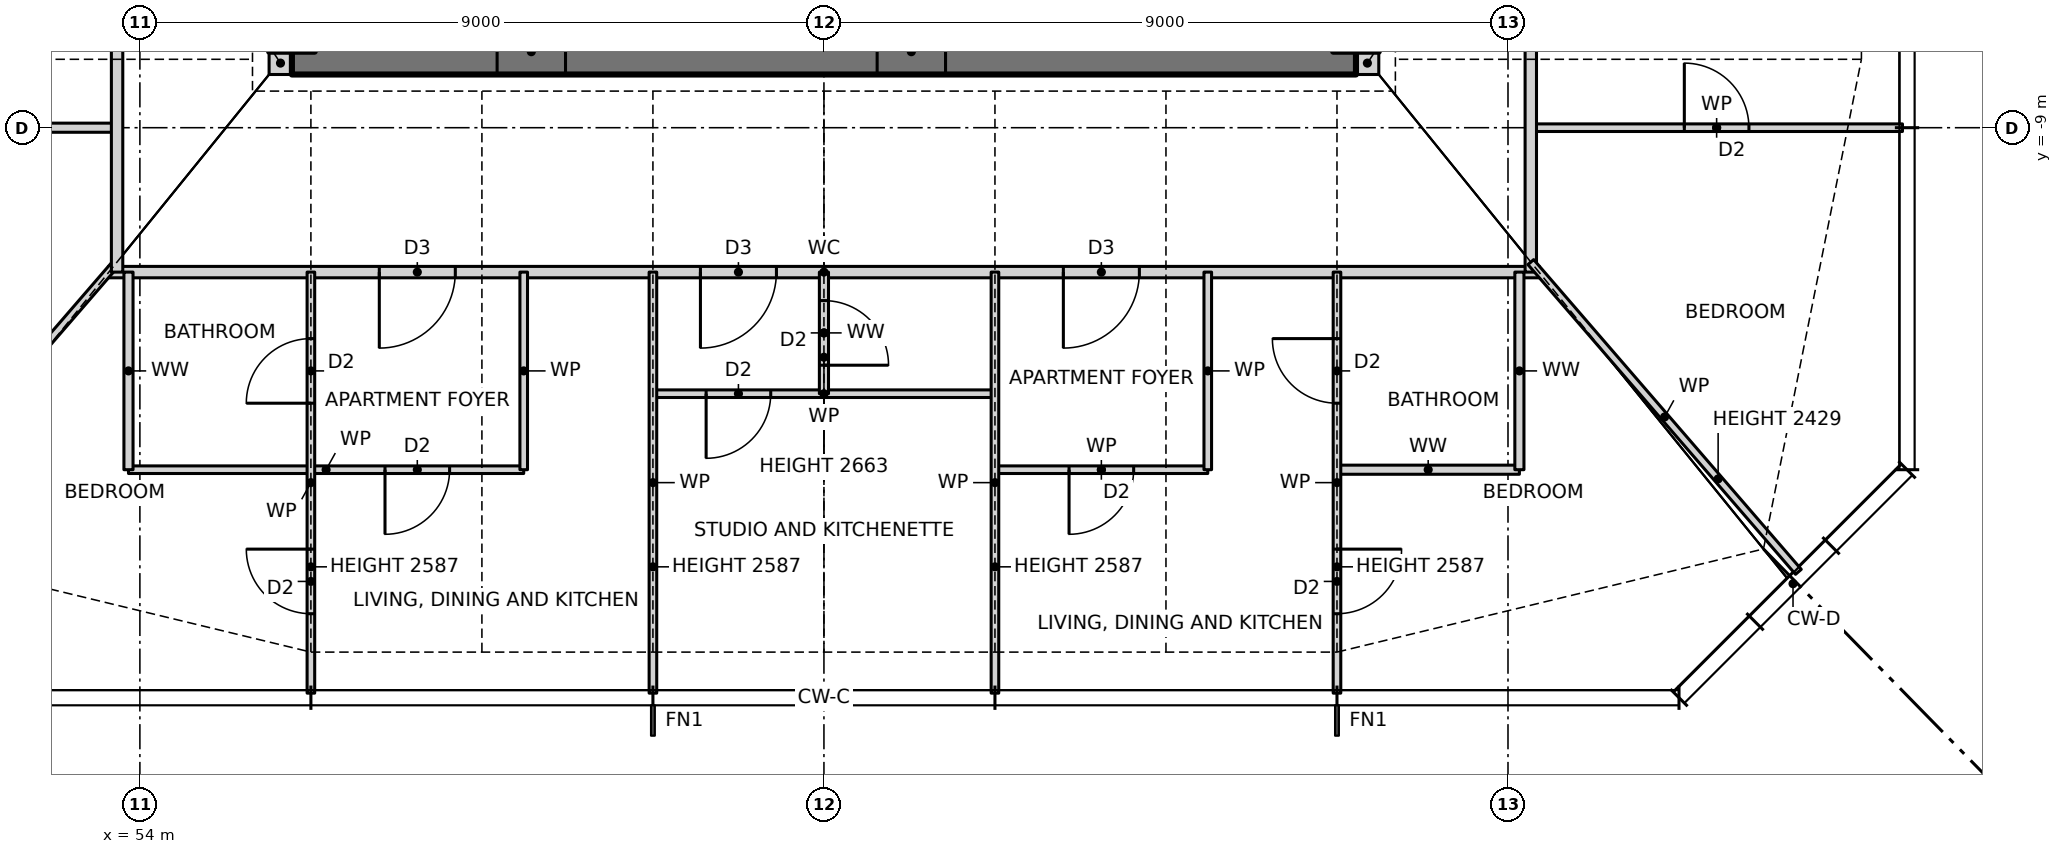
"""IFC4 building model, lengths in metres.
Left out: names, types, materials, properties, quantities, classifications, styles, units other than length and angle.
Written with IfcOpenShell. Run it as: python <this file> out.ifc"""

import sys

from ifc_helpers import new_model, si_unit, direction, frame, frame_2d, origin, place, context, subcontext, project, spatial, rectangle, extrude, element, fill, save


model = new_model("IFC4")
c1 = context("Model", 3, precision=1e-05, world=origin(), true_north=direction((0.0, 1.0)))
c2 = subcontext(c1, "Body", "Model", "MODEL_VIEW")
j1 = project(units=[si_unit("LENGTHUNIT", "METRE"), si_unit("PLANEANGLEUNIT", "RADIAN")], contexts=[c1])
p1 = place(None, origin())
s1 = spatial("IfcSite", under=j1, at=p1, CompositionType="ELEMENT")
p2 = place(p1, origin())
s2 = spatial("IfcBuilding", under=s1, at=p2, CompositionType="ELEMENT")
p3 = place(p2, frame((0.0, 0.0, 80.5)))
s3 = spatial("IfcBuildingStorey", under=s2, at=p3, CompositionType="ELEMENT", Elevation=80.5)
for number, where, z_axis, x_axis in (
    (1, (55.7, -8.15, 0.0), (0.0, 0.0, 1.0), (1.0, 0.0, 0.0)),
    (2, (70.0, -8.15, 0.0), (0.0, 0.0, 1.0), (1.0, 0.0, 0.0)),
):
    element("IfcWall", number, at=place(p3, frame(where, z_axis=z_axis, x_axis=x_axis)), inside=s3, PredefinedType="SOLIDWALL", context=c2, shape_type="SweptSolid", body=[
        extrude(rectangle(XDim=0.3, YDim=0.3, at=frame_2d((0.15, 0.0))), origin(), (0.0, 0.0, 1.0), 3.5),
    ])
p4 = place(p3, frame((56.0, -8.0, 0.0), z_axis=(0.0, 0.0, 1.0), x_axis=(1.0, 0.0, 0.0)))
e3 = element("IfcWall", 3, at=p4, inside=s3, PredefinedType="SHEAR", context=c2, shape_type="SweptSolid", body=[
    extrude(rectangle(XDim=14.0, YDim=0.6, at=frame_2d((7.0, 0.0))), origin(), (0.0, 0.0, 1.0), 3.5),
])
p5 = place(p4, frame((2.7, 0.0, 0.0)))
e4 = element("IfcOpeningElement", 4, at=p5, cuts=e3, PredefinedType="OPENING", context=c2, shape_type="SweptSolid", body=[
    extrude(rectangle(XDim=0.9, YDim=2.1, at=frame_2d((0.45, 1.05))), frame((0.0, 0.31, 0.0), z_axis=(0.0, -1.0, 0.0), x_axis=(1.0, 0.0, 0.0)), (0.0, 0.0, 1.0), 0.62),
])
p6 = place(p4, frame((7.7, 0.0, 0.0)))
e5 = element("IfcOpeningElement", 5, at=p6, cuts=e3, PredefinedType="OPENING", context=c2, shape_type="SweptSolid", body=[
    extrude(rectangle(XDim=0.9, YDim=2.1, at=frame_2d((0.45, 1.05))), frame((0.0, 0.31, 0.0), z_axis=(0.0, -1.0, 0.0), x_axis=(1.0, 0.0, 0.0)), (0.0, 0.0, 1.0), 0.62),
])
p7 = place(p3, frame((53.85, -13.5, 0.0), z_axis=(0.0, 0.0, 1.0), x_axis=(1.0, 0.0, 0.0)))
e6 = element("IfcWall", 6, at=p7, inside=s3, PredefinedType="PARTITIONING", context=c2, shape_type="SweptSolid", body=[
    extrude(rectangle(XDim=5.2, YDim=0.1, at=frame_2d((2.6, 0.0))), origin(), (0.0, 0.0, 1.0), 3.27),
])
p8 = place(p7, frame((3.375, 0.0, 0.0)))
e7 = element("IfcOpeningElement", 7, at=p8, cuts=e6, PredefinedType="OPENING", context=c2, shape_type="SweptSolid", body=[
    extrude(rectangle(XDim=0.85, YDim=2.1, at=frame_2d((0.425, 1.05))), frame((0.0, 0.06, 0.0), z_axis=(0.0, -1.0, 0.0), x_axis=(1.0, 0.0, 0.0)), (0.0, 0.0, 1.0), 0.12),
])
p9 = place(p3, frame((65.25, -13.5, 0.0), z_axis=(0.0, 0.0, 1.0), x_axis=(1.0, 0.0, 0.0)))
e8 = element("IfcWall", 8, at=p9, inside=s3, PredefinedType="PARTITIONING", context=c2, shape_type="SweptSolid", body=[
    extrude(rectangle(XDim=2.8, YDim=0.1, at=frame_2d((1.4, 0.0))), origin(), (0.0, 0.0, 1.0), 3.27),
])
p10 = place(p9, frame((0.975, 0.0, 0.0)))
e9 = element("IfcOpeningElement", 9, at=p10, cuts=e8, PredefinedType="OPENING", context=c2, shape_type="SweptSolid", body=[
    extrude(rectangle(XDim=0.85, YDim=2.1, at=frame_2d((0.425, 1.05))), frame((0.0, 0.06, 0.0), z_axis=(0.0, -1.0, 0.0), x_axis=(1.0, 0.0, 0.0)), (0.0, 0.0, 1.0), 0.12),
])
p11 = place(p3, frame((69.75, -13.5, 0.0), z_axis=(0.0, 0.0, 1.0), x_axis=(1.0, 0.0, 0.0)))
e10 = element("IfcWall", 10, at=p11, inside=s3, PredefinedType="PARTITIONING", context=c2, shape_type="SweptSolid", body=[
    extrude(rectangle(XDim=2.4, YDim=0.12, at=frame_2d((1.2, 0.0))), origin(), (0.0, 0.0, 1.0), 3.27),
])
p12 = place(p3, frame((60.75, -12.5, 0.0), z_axis=(0.0, 0.0, 1.0), x_axis=(1.0, 0.0, 0.0)))
e11 = element("IfcWall", 11, at=p12, inside=s3, PredefinedType="PARTITIONING", context=c2, shape_type="SweptSolid", body=[
    extrude(rectangle(XDim=4.5, YDim=0.1, at=frame_2d((2.25, 0.0))), origin(), (0.0, 0.0, 1.0), 3.27),
])
p13 = place(p12, frame((0.7, 0.0, 0.0)))
e12 = element("IfcOpeningElement", 12, at=p13, cuts=e11, PredefinedType="OPENING", context=c2, shape_type="SweptSolid", body=[
    extrude(rectangle(XDim=0.85, YDim=2.1, at=frame_2d((0.425, 1.05))), frame((0.0, 0.06, 0.0), z_axis=(0.0, -1.0, 0.0), x_axis=(1.0, 0.0, 0.0)), (0.0, 0.0, 1.0), 0.12),
])
p14 = place(p3, frame((53.586, -10.9, 0.0), z_axis=(0.0, 0.0, 1.0), x_axis=(1.0, 0.0, 0.0)))
e13 = element("IfcWall", 13, at=p14, inside=s3, PredefinedType="PARTITIONING", context=c2, shape_type="SweptSolid", body=[
    extrude(rectangle(XDim=18.828, YDim=0.15, at=frame_2d((9.414, 0.0))), origin(), (0.0, 0.0, 1.0), 3.27),
])
p15 = place(p14, frame((3.564, 0.0, 0.0)))
e14 = element("IfcOpeningElement", 14, at=p15, cuts=e13, PredefinedType="OPENING", context=c2, shape_type="SweptSolid", body=[
    extrude(rectangle(XDim=1.0, YDim=2.1, at=frame_2d((0.5, 1.05))), frame((0.0, 0.085, 0.0), z_axis=(0.0, -1.0, 0.0), x_axis=(1.0, 0.0, 0.0)), (0.0, 0.0, 1.0), 0.17),
])
p16 = place(p14, frame((7.789, 0.0, 0.0)))
e15 = element("IfcOpeningElement", 15, at=p16, cuts=e13, PredefinedType="OPENING", context=c2, shape_type="SweptSolid", body=[
    extrude(rectangle(XDim=1.0, YDim=2.1, at=frame_2d((0.5, 1.05))), frame((0.0, 0.085, 0.0), z_axis=(0.0, -1.0, 0.0), x_axis=(1.0, 0.0, 0.0)), (0.0, 0.0, 1.0), 0.17),
])
p17 = place(p14, frame((12.564, 0.0, 0.0)))
e16 = element("IfcOpeningElement", 16, at=p17, cuts=e13, PredefinedType="OPENING", context=c2, shape_type="SweptSolid", body=[
    extrude(rectangle(XDim=1.0, YDim=2.1, at=frame_2d((0.5, 1.05))), frame((0.0, 0.085, 0.0), z_axis=(0.0, -1.0, 0.0), x_axis=(1.0, 0.0, 0.0)), (0.0, 0.0, 1.0), 0.17),
])
p18 = place(p3, frame((48.81, -9.0, 0.0), z_axis=(0.0, 0.0, 1.0), x_axis=(1.0, 0.0, 0.0)))
e17 = element("IfcWall", 17, at=p18, inside=s3, PredefinedType="PARTITIONING", context=c2, shape_type="SweptSolid", body=[
    extrude(rectangle(XDim=4.89, YDim=0.12, at=frame_2d((2.445, 0.0))), origin(), (0.0, 0.0, 1.0), 3.27),
])
p19 = place(p18, frame((0.72, 0.0, 0.0)))
e18 = element("IfcOpeningElement", 18, at=p19, cuts=e17, PredefinedType="OPENING", context=c2, shape_type="SweptSolid", body=[
    extrude(rectangle(XDim=0.85, YDim=2.1, at=frame_2d((0.425, 1.05))), frame((0.0, 0.07, 0.0), z_axis=(0.0, -1.0, 0.0), x_axis=(1.0, 0.0, 0.0)), (0.0, 0.0, 1.0), 0.14),
])
p20 = place(p3, frame((72.3, -9.0, 0.0), z_axis=(0.0, 0.0, 1.0), x_axis=(1.0, 0.0, 0.0)))
e19 = element("IfcWall", 19, at=p20, inside=s3, PredefinedType="PARTITIONING", context=c2, shape_type="SweptSolid", body=[
    extrude(rectangle(XDim=4.89, YDim=0.1, at=frame_2d((2.445, 0.0))), origin(), (0.0, 0.0, 1.0), 3.27),
])
p21 = place(p20, frame((2.02, 0.0, 0.0)))
e20 = element("IfcOpeningElement", 20, at=p21, cuts=e19, PredefinedType="OPENING", context=c2, shape_type="SweptSolid", body=[
    extrude(rectangle(XDim=0.85, YDim=2.1, at=frame_2d((0.425, 1.05))), frame((0.0, 0.06, 0.0), z_axis=(0.0, -1.0, 0.0), x_axis=(1.0, 0.0, 0.0)), (0.0, 0.0, 1.0), 0.12),
])
p22 = place(p3, frame((50.179, -14.844, 0.0), z_axis=(0.0, 0.0, 1.0), x_axis=(0.653713095188, 0.756742485381, 0.0)))
e21 = element("IfcWall", 21, at=p22, inside=s3, PredefinedType="PARTITIONING", context=c2, shape_type="SweptSolid", body=[
    extrude(rectangle(XDim=5.386, YDim=0.1, at=frame_2d((2.693, 0.0))), origin(), (0.0, 0.0, 1.0), 2.429),
])
p23 = place(p3, frame((72.3, -10.9, 0.0), z_axis=(0.0, 0.0, 1.0), x_axis=(0.0, 1.0, 0.0)))
e22 = element("IfcWall", 22, at=p23, inside=s3, PredefinedType="PARTITIONING", context=c2, shape_type="SweptSolid", body=[
    extrude(rectangle(XDim=21.668, YDim=0.15, at=frame_2d((10.834, 0.0))), origin(), (0.0, 0.0, 1.0), 3.27),
])
p24 = place(p23, frame((10.4, 0.0, 0.0)))
e23 = element("IfcOpeningElement", 23, at=p24, cuts=e22, PredefinedType="OPENING", context=c2, shape_type="SweptSolid", body=[
    extrude(rectangle(XDim=1.0, YDim=2.1, at=frame_2d((0.5, 1.05))), frame((0.0, 0.085, 0.0), z_axis=(0.0, -1.0, 0.0), x_axis=(1.0, 0.0, 0.0)), (0.0, 0.0, 1.0), 0.17),
])
p25 = place(p3, frame((72.15, -13.5, 0.0), z_axis=(0.0, 0.0, 1.0), x_axis=(0.0, 1.0, 0.0)))
e24 = element("IfcWall", 24, at=p25, inside=s3, PredefinedType="PARTITIONING", context=c2, shape_type="SweptSolid", body=[
    extrude(rectangle(XDim=2.6, YDim=0.12, at=frame_2d((1.3, 0.0))), origin(), (0.0, 0.0, 1.0), 3.27),
])
p26 = place(p3, frame((69.75, -16.44, 0.0), z_axis=(0.0, 0.0, 1.0), x_axis=(0.0, 1.0, 0.0)))
e25 = element("IfcWall", 25, at=p26, inside=s3, PredefinedType="PARTITIONING", context=c2, shape_type="SweptSolid", body=[
    extrude(rectangle(XDim=5.54, YDim=0.1, at=frame_2d((2.77, 0.0))), origin(), (0.0, 0.0, 1.0), 2.587),
])
p27 = place(p26, frame((3.815, 0.0, 0.0)))
e26 = element("IfcOpeningElement", 26, at=p27, cuts=e25, PredefinedType="OPENING", context=c2, shape_type="SweptSolid", body=[
    extrude(rectangle(XDim=0.85, YDim=2.1, at=frame_2d((0.425, 1.05))), frame((0.0, 0.06, 0.0), z_axis=(0.0, -1.0, 0.0), x_axis=(1.0, 0.0, 0.0)), (0.0, 0.0, 1.0), 0.12),
])
p28 = place(p26, frame((1.045, 0.0, 0.0)))
e27 = element("IfcOpeningElement", 27, at=p28, cuts=e25, PredefinedType="OPENING", context=c2, shape_type="SweptSolid", body=[
    extrude(rectangle(XDim=0.85, YDim=2.1, at=frame_2d((0.425, 1.05))), frame((0.0, 0.06, 0.0), z_axis=(0.0, -1.0, 0.0), x_axis=(1.0, 0.0, 0.0)), (0.0, 0.0, 1.0), 0.12),
])
p29 = place(p3, frame((68.05, -13.5, 0.0), z_axis=(0.0, 0.0, 1.0), x_axis=(0.0, 1.0, 0.0)))
e28 = element("IfcWall", 28, at=p29, inside=s3, PredefinedType="PARTITIONING", context=c2, shape_type="SweptSolid", body=[
    extrude(rectangle(XDim=2.6, YDim=0.1, at=frame_2d((1.3, 0.0))), origin(), (0.0, 0.0, 1.0), 3.27),
])
p30 = place(p3, frame((65.25, -16.44, 0.0), z_axis=(0.0, 0.0, 1.0), x_axis=(0.0, 1.0, 0.0)))
e29 = element("IfcWall", 29, at=p30, inside=s3, PredefinedType="PARTITIONING", context=c2, shape_type="SweptSolid", body=[
    extrude(rectangle(XDim=5.54, YDim=0.1, at=frame_2d((2.77, 0.0))), origin(), (0.0, 0.0, 1.0), 2.587),
])
p31 = place(p3, frame((63.0, -12.5, 0.0), z_axis=(0.0, 0.0, 1.0), x_axis=(0.0, 1.0, 0.0)))
e30 = element("IfcWall", 30, at=p31, inside=s3, PredefinedType="PARTITIONING", context=c2, shape_type="SweptSolid", body=[
    extrude(rectangle(XDim=1.6, YDim=0.12, at=frame_2d((0.8, 0.0))), origin(), (0.0, 0.0, 1.0), 2.663),
])
p32 = place(p31, frame((0.375, 0.0, 0.0)))
e31 = element("IfcOpeningElement", 31, at=p32, cuts=e30, PredefinedType="OPENING", context=c2, shape_type="SweptSolid", body=[
    extrude(rectangle(XDim=0.85, YDim=2.1, at=frame_2d((0.425, 1.05))), frame((0.0, 0.07, 0.0), z_axis=(0.0, -1.0, 0.0), x_axis=(1.0, 0.0, 0.0)), (0.0, 0.0, 1.0), 0.14),
])
p33 = place(p3, frame((60.75, -16.44, 0.0), z_axis=(0.0, 0.0, 1.0), x_axis=(0.0, 1.0, 0.0)))
e32 = element("IfcWall", 32, at=p33, inside=s3, PredefinedType="PARTITIONING", context=c2, shape_type="SweptSolid", body=[
    extrude(rectangle(XDim=5.54, YDim=0.1, at=frame_2d((2.77, 0.0))), origin(), (0.0, 0.0, 1.0), 2.587),
])
p34 = place(p3, frame((59.05, -13.5, 0.0), z_axis=(0.0, 0.0, 1.0), x_axis=(0.0, 1.0, 0.0)))
e33 = element("IfcWall", 33, at=p34, inside=s3, PredefinedType="PARTITIONING", context=c2, shape_type="SweptSolid", body=[
    extrude(rectangle(XDim=2.6, YDim=0.1, at=frame_2d((1.3, 0.0))), origin(), (0.0, 0.0, 1.0), 3.27),
])
p35 = place(p3, frame((56.25, -16.44, 0.0), z_axis=(0.0, 0.0, 1.0), x_axis=(0.0, 1.0, 0.0)))
e34 = element("IfcWall", 34, at=p35, inside=s3, PredefinedType="PARTITIONING", context=c2, shape_type="SweptSolid", body=[
    extrude(rectangle(XDim=5.54, YDim=0.1, at=frame_2d((2.77, 0.0))), origin(), (0.0, 0.0, 1.0), 2.587),
])
p36 = place(p35, frame((3.815, 0.0, 0.0)))
e35 = element("IfcOpeningElement", 35, at=p36, cuts=e34, PredefinedType="OPENING", context=c2, shape_type="SweptSolid", body=[
    extrude(rectangle(XDim=0.85, YDim=2.1, at=frame_2d((0.425, 1.05))), frame((0.0, 0.06, 0.0), z_axis=(0.0, -1.0, 0.0), x_axis=(1.0, 0.0, 0.0)), (0.0, 0.0, 1.0), 0.12),
])
p37 = place(p35, frame((1.045, 0.0, 0.0)))
e36 = element("IfcOpeningElement", 36, at=p37, cuts=e34, PredefinedType="OPENING", context=c2, shape_type="SweptSolid", body=[
    extrude(rectangle(XDim=0.85, YDim=2.1, at=frame_2d((0.425, 1.05))), frame((0.0, 0.06, 0.0), z_axis=(0.0, -1.0, 0.0), x_axis=(1.0, 0.0, 0.0)), (0.0, 0.0, 1.0), 0.12),
])
p38 = place(p3, frame((53.85, -13.5, 0.0), z_axis=(0.0, 0.0, 1.0), x_axis=(0.0, 1.0, 0.0)))
e37 = element("IfcWall", 37, at=p38, inside=s3, PredefinedType="PARTITIONING", context=c2, shape_type="SweptSolid", body=[
    extrude(rectangle(XDim=2.6, YDim=0.12, at=frame_2d((1.3, 0.0))), origin(), (0.0, 0.0, 1.0), 3.27),
])
p39 = place(p3, frame((53.7, -10.9, 0.0), z_axis=(0.0, 0.0, 1.0), x_axis=(0.0, 1.0, 0.0)))
e38 = element("IfcWall", 38, at=p39, inside=s3, PredefinedType="PARTITIONING", context=c2, shape_type="SweptSolid", body=[
    extrude(rectangle(XDim=21.668, YDim=0.15, at=frame_2d((10.834, 0.0))), origin(), (0.0, 0.0, 1.0), 3.27),
])
p40 = place(p39, frame((18.0, 0.0, 0.0)))
e39 = element("IfcOpeningElement", 39, at=p40, cuts=e38, PredefinedType="OPENING", context=c2, shape_type="SweptSolid", body=[
    extrude(rectangle(XDim=1.0, YDim=2.1, at=frame_2d((0.5, 1.05))), frame((0.0, 0.085, 0.0), z_axis=(0.0, -1.0, 0.0), x_axis=(1.0, 0.0, 0.0)), (0.0, 0.0, 1.0), 0.17),
])
p41 = place(p39, frame((5.4, 0.0, 0.0)))
e40 = element("IfcOpeningElement", 40, at=p41, cuts=e38, PredefinedType="OPENING", context=c2, shape_type="SweptSolid", body=[
    extrude(rectangle(XDim=1.0, YDim=2.1, at=frame_2d((0.5, 1.05))), frame((0.0, 0.085, 0.0), z_axis=(0.0, -1.0, 0.0), x_axis=(1.0, 0.0, 0.0)), (0.0, 0.0, 1.0), 0.17),
])
p42 = place(p3, frame((75.821, -14.844, 0.0), z_axis=(0.0, 0.0, 1.0), x_axis=(-0.653713095188, 0.756742485381, 0.0)))
e41 = element("IfcWall", 41, at=p42, inside=s3, PredefinedType="PARTITIONING", context=c2, shape_type="SweptSolid", body=[
    extrude(rectangle(XDim=5.386, YDim=0.1, at=frame_2d((2.693, 0.0))), origin(), (0.0, 0.0, 1.0), 2.429),
])
p43 = place(p15, frame((1.0, 0.0, 0.0), z_axis=(0.0, 0.0, 1.0), x_axis=(-1.0, 0.0, 0.0)))
e42 = element("IfcDoor", 42, at=p43, inside=s3, OperationType="SINGLE_SWING_RIGHT", PredefinedType="DOOR", context=c2, shape_type="SweptSolid", body=[
    extrude(rectangle(XDim=1.0, YDim=2.1, at=frame_2d((0.5, 1.05))), frame((0.0, 0.025, 0.0), z_axis=(0.0, -1.0, 0.0), x_axis=(1.0, 0.0, 0.0)), (0.0, 0.0, 1.0), 0.05),
])
fill(e14, e42)
p44 = place(p8, frame((0.85, 0.0, 0.0), z_axis=(0.0, 0.0, 1.0), x_axis=(-1.0, 0.0, 0.0)))
e43 = element("IfcDoor", 43, at=p44, inside=s3, OperationType="SINGLE_SWING_RIGHT", PredefinedType="DOOR", context=c2, shape_type="SweptSolid", body=[
    extrude(rectangle(XDim=0.85, YDim=2.1, at=frame_2d((0.425, 1.05))), frame((0.0, 0.025, 0.0), z_axis=(0.0, -1.0, 0.0), x_axis=(1.0, 0.0, 0.0)), (0.0, 0.0, 1.0), 0.05),
])
fill(e7, e43)
p45 = place(p36, origin())
e44 = element("IfcDoor", 44, at=p45, inside=s3, OperationType="SINGLE_SWING_LEFT", PredefinedType="DOOR", context=c2, shape_type="SweptSolid", body=[
    extrude(rectangle(XDim=0.85, YDim=2.1, at=frame_2d((0.425, 1.05))), frame((0.0, 0.025, 0.0), z_axis=(0.0, -1.0, 0.0), x_axis=(1.0, 0.0, 0.0)), (0.0, 0.0, 1.0), 0.05),
])
fill(e35, e44)
p46 = place(p37, origin())
e45 = element("IfcDoor", 45, at=p46, inside=s3, OperationType="SINGLE_SWING_RIGHT", PredefinedType="DOOR", context=c2, shape_type="SweptSolid", body=[
    extrude(rectangle(XDim=0.85, YDim=2.1, at=frame_2d((0.425, 1.05))), frame((0.0, 0.025, 0.0), z_axis=(0.0, -1.0, 0.0), x_axis=(1.0, 0.0, 0.0)), (0.0, 0.0, 1.0), 0.05),
])
fill(e36, e45)
p47 = place(p13, frame((0.85, 0.0, 0.0), z_axis=(0.0, 0.0, 1.0), x_axis=(-1.0, 0.0, 0.0)))
e46 = element("IfcDoor", 46, at=p47, inside=s3, OperationType="SINGLE_SWING_RIGHT", PredefinedType="DOOR", context=c2, shape_type="SweptSolid", body=[
    extrude(rectangle(XDim=0.85, YDim=2.1, at=frame_2d((0.425, 1.05))), frame((0.0, 0.025, 0.0), z_axis=(0.0, -1.0, 0.0), x_axis=(1.0, 0.0, 0.0)), (0.0, 0.0, 1.0), 0.05),
])
fill(e12, e46)
p48 = place(p16, frame((1.0, 0.0, 0.0), z_axis=(0.0, 0.0, 1.0), x_axis=(-1.0, 0.0, 0.0)))
e47 = element("IfcDoor", 47, at=p48, inside=s3, OperationType="SINGLE_SWING_RIGHT", PredefinedType="DOOR", context=c2, shape_type="SweptSolid", body=[
    extrude(rectangle(XDim=1.0, YDim=2.1, at=frame_2d((0.5, 1.05))), frame((0.0, 0.025, 0.0), z_axis=(0.0, -1.0, 0.0), x_axis=(1.0, 0.0, 0.0)), (0.0, 0.0, 1.0), 0.05),
])
fill(e15, e47)
p49 = place(p32, frame((0.85, 0.0, 0.0), z_axis=(0.0, 0.0, 1.0), x_axis=(-1.0, 0.0, 0.0)))
e48 = element("IfcDoor", 48, at=p49, inside=s3, OperationType="SINGLE_SWING_RIGHT", PredefinedType="DOOR", context=c2, shape_type="SweptSolid", body=[
    extrude(rectangle(XDim=0.85, YDim=2.1, at=frame_2d((0.425, 1.05))), frame((0.0, 0.025, 0.0), z_axis=(0.0, -1.0, 0.0), x_axis=(1.0, 0.0, 0.0)), (0.0, 0.0, 1.0), 0.05),
])
fill(e31, e48)
p50 = place(p17, frame((1.0, 0.0, 0.0), z_axis=(0.0, 0.0, 1.0), x_axis=(-1.0, 0.0, 0.0)))
e49 = element("IfcDoor", 49, at=p50, inside=s3, OperationType="SINGLE_SWING_RIGHT", PredefinedType="DOOR", context=c2, shape_type="SweptSolid", body=[
    extrude(rectangle(XDim=1.0, YDim=2.1, at=frame_2d((0.5, 1.05))), frame((0.0, 0.025, 0.0), z_axis=(0.0, -1.0, 0.0), x_axis=(1.0, 0.0, 0.0)), (0.0, 0.0, 1.0), 0.05),
])
fill(e16, e49)
p51 = place(p10, frame((0.85, 0.0, 0.0), z_axis=(0.0, 0.0, 1.0), x_axis=(-1.0, 0.0, 0.0)))
e50 = element("IfcDoor", 50, at=p51, inside=s3, OperationType="SINGLE_SWING_RIGHT", PredefinedType="DOOR", context=c2, shape_type="SweptSolid", body=[
    extrude(rectangle(XDim=0.85, YDim=2.1, at=frame_2d((0.425, 1.05))), frame((0.0, 0.025, 0.0), z_axis=(0.0, -1.0, 0.0), x_axis=(1.0, 0.0, 0.0)), (0.0, 0.0, 1.0), 0.05),
])
fill(e9, e50)
p52 = place(p27, origin())
e51 = element("IfcDoor", 51, at=p52, inside=s3, OperationType="SINGLE_SWING_RIGHT", PredefinedType="DOOR", context=c2, shape_type="SweptSolid", body=[
    extrude(rectangle(XDim=0.85, YDim=2.1, at=frame_2d((0.425, 1.05))), frame((0.0, 0.025, 0.0), z_axis=(0.0, -1.0, 0.0), x_axis=(1.0, 0.0, 0.0)), (0.0, 0.0, 1.0), 0.05),
])
fill(e26, e51)
p53 = place(p28, frame((0.85, 0.0, 0.0), z_axis=(0.0, 0.0, 1.0), x_axis=(-1.0, 0.0, 0.0)))
e52 = element("IfcDoor", 52, at=p53, inside=s3, OperationType="SINGLE_SWING_LEFT", PredefinedType="DOOR", context=c2, shape_type="SweptSolid", body=[
    extrude(rectangle(XDim=0.85, YDim=2.1, at=frame_2d((0.425, 1.05))), frame((0.0, 0.025, 0.0), z_axis=(0.0, -1.0, 0.0), x_axis=(1.0, 0.0, 0.0)), (0.0, 0.0, 1.0), 0.05),
])
fill(e27, e52)
p54 = place(p21, origin())
e53 = element("IfcDoor", 53, at=p54, inside=s3, OperationType="SINGLE_SWING_LEFT", PredefinedType="DOOR", context=c2, shape_type="SweptSolid", body=[
    extrude(rectangle(XDim=0.85, YDim=2.1, at=frame_2d((0.425, 1.05))), frame((0.0, 0.025, 0.0), z_axis=(0.0, -1.0, 0.0), x_axis=(1.0, 0.0, 0.0)), (0.0, 0.0, 1.0), 0.05),
])
fill(e20, e53)
p55 = place(p5, origin())
e54 = element("IfcDoor", 54, at=p55, inside=s3, OperationType="SINGLE_SWING_LEFT", PredefinedType="DOOR", context=c2, shape_type="SweptSolid", body=[
    extrude(rectangle(XDim=0.9, YDim=2.1, at=frame_2d((0.45, 1.05))), frame((0.0, 0.025, 0.0), z_axis=(0.0, -1.0, 0.0), x_axis=(1.0, 0.0, 0.0)), (0.0, 0.0, 1.0), 0.05),
])
fill(e4, e54)
p56 = place(p6, origin())
e55 = element("IfcDoor", 55, at=p56, inside=s3, OperationType="SINGLE_SWING_LEFT", PredefinedType="DOOR", context=c2, shape_type="SweptSolid", body=[
    extrude(rectangle(XDim=0.9, YDim=2.1, at=frame_2d((0.45, 1.05))), frame((0.0, 0.025, 0.0), z_axis=(0.0, -1.0, 0.0), x_axis=(1.0, 0.0, 0.0)), (0.0, 0.0, 1.0), 0.05),
])
fill(e5, e55)
save(model, sys.argv[1])
